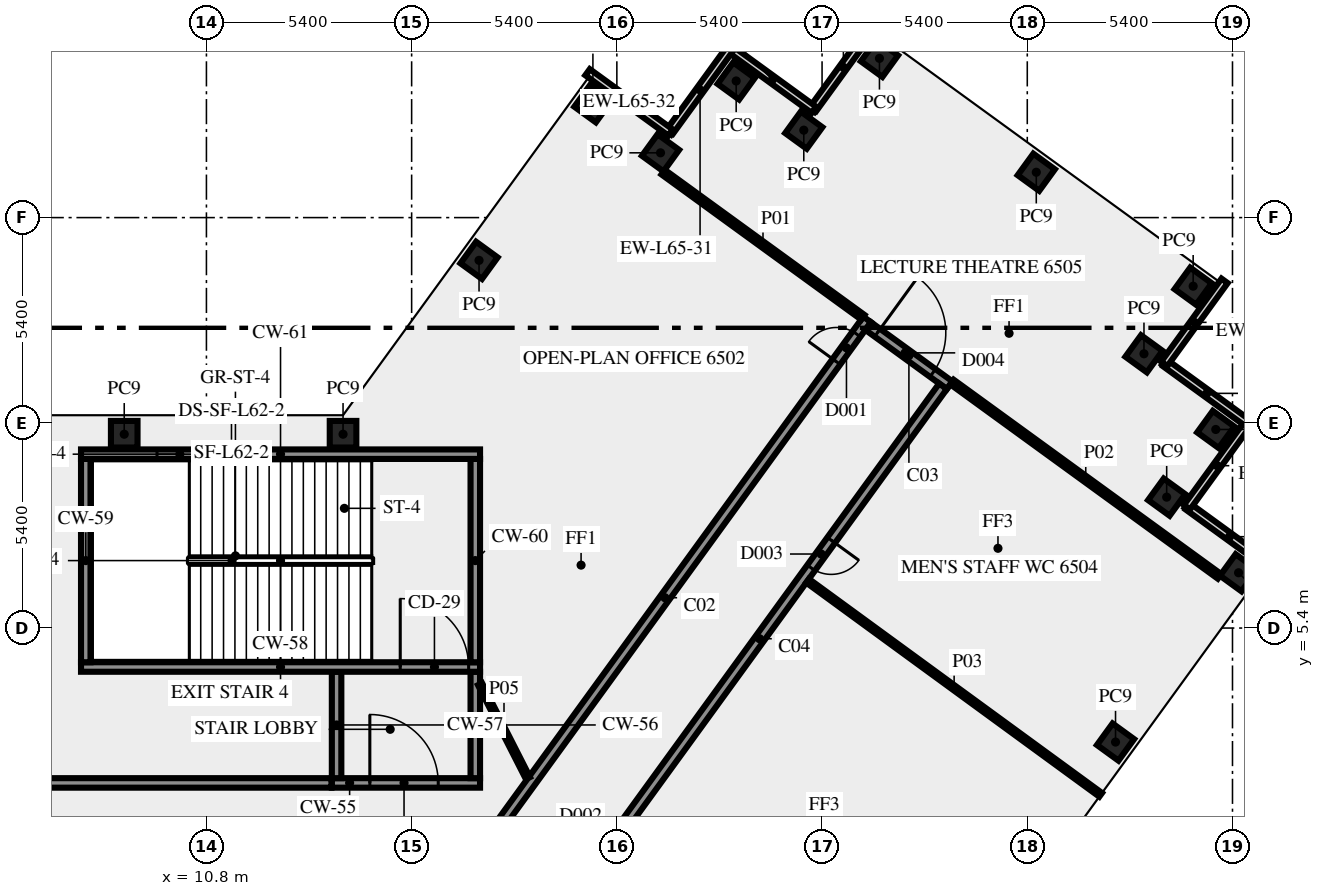
"""IFC4 building model, lengths in metres.
Left out: names, types, materials, properties, quantities, classifications, styles, units other than length and angle.
Written with IfcOpenShell. Run it as: python <this file> out.ifc"""

import sys

from ifc_helpers import new_model, si_unit, direction, frame, frame_2d, origin, origin_2d, place, context, subcontext, project, spatial, rectangle, extrude, element, fill, save


model = new_model("IFC4")
c1 = context("Model", 3, precision=1e-05, world=origin(), true_north=direction((0.0, 1.0)))
c2 = subcontext(c1, "Body", "Model", "MODEL_VIEW")
j1 = project(units=[si_unit("LENGTHUNIT", "METRE"), si_unit("PLANEANGLEUNIT", "RADIAN")], contexts=[c1])
p1 = place(None, origin())
s1 = spatial("IfcSite", under=j1, at=p1, CompositionType="ELEMENT")
p2 = place(p1, origin())
s2 = spatial("IfcBuilding", under=s1, at=p2, CompositionType="ELEMENT")
p3 = place(p2, frame((0.0, 0.0, 281.0)))
s3 = spatial("IfcBuildingStorey", under=s2, at=p3, CompositionType="ELEMENT", Elevation=281.0)
for number, where, z_axis, x_axis in (
    (1, (34.722, 2.4, 0.0), (0.0, 0.0, 1.0), (0.588, 0.809, 0.0)),
    (2, (37.96, 6.855, 0.0), (0.0, 0.0, 1.0), (0.588, 0.809, 0.0)),
    (3, (36.068, 8.844, 0.0), (0.0, 0.0, 1.0), (0.588, 0.809, 0.0)),
    (4, (37.36, 10.625, 0.0), (0.0, 0.0, 1.0), (0.588, 0.809, 0.0)),
    (5, (35.471, 12.616, 0.0), (0.0, 0.0, 1.0), (-0.809, 0.588, 0.0)),
    (6, (36.765, 14.395, 0.0), (0.0, 0.0, 1.0), (-0.809, 0.588, 0.0)),
    (7, (32.637, 17.393, 0.0), (0.0, 0.0, 1.0), (-0.809, 0.588, 0.0)),
    (8, (28.51, 20.39, 0.0), (0.0, 0.0, 1.0), (-0.588, -0.809, 0.0)),
    (9, (26.519, 18.5, 0.0), (0.0, 0.0, 1.0), (-0.809, 0.588, 0.0)),
    (10, (24.74, 19.795, 0.0), (0.0, 0.0, 1.0), (-0.588, -0.809, 0.0)),
    (11, (22.749, 17.904, 0.0), (0.0, 0.0, 1.0), (-0.588, -0.809, 0.0)),
    (12, (20.97, 19.195, 0.0), (0.0, 0.0, 1.0), (-0.588, -0.809, 0.0)),
    (13, (17.974, 15.075, 0.0), (0.0, 0.0, 1.0), (-0.588, -0.809, 0.0)),
    (14, (14.395, 10.5, 0.0), (0.0, 0.0, 1.0), (-1.0, 0.0, 0.0)),
    (15, (8.637, 10.5, 0.0), (0.0, 0.0, 1.0), (-1.0, 0.0, 0.0)),
):
    element("IfcColumn", number, at=place(p3, frame(where, z_axis=z_axis, x_axis=x_axis)), inside=s3, PredefinedType="COLUMN", context=c2, shape_type="SweptSolid", body=[
        extrude(rectangle(XDim=0.7, YDim=0.7, at=origin_2d()), origin(), (0.0, 0.0, 1.0), 3.65),
    ])
for number, where, z_axis, x_axis in (
    (16, (38.814, 7.01, 0.0), (0.0, 0.0, 1.0), (-0.809, 0.588, 0.0)),
    (17, (36.602, 8.58, 0.0), (0.0, 0.0, 1.0), (0.588, 0.809, 0.0)),
    (18, (38.216, 10.782, 0.0), (0.0, 0.0, 1.0), (-0.809, 0.588, 0.0)),
    (19, (36.005, 12.352, 0.0), (0.0, 0.0, 1.0), (0.588, 0.809, 0.0)),
):
    element("IfcWall", number, at=place(p3, frame(where, z_axis=z_axis, x_axis=x_axis)), inside=s3, PredefinedType="SOLIDWALL", context=c2, shape_type="SweptSolid", body=[
        extrude(rectangle(XDim=2.7, YDim=0.2, at=frame_2d((1.35, 0.0))), origin(), (0.0, 0.0, 1.0), 3.65),
    ])
for number, where, z_axis, x_axis in (
    (20, (28.354, 21.247, 0.0), (0.0, 0.0, 1.0), (-0.588, -0.809, 0.0)),
    (21, (26.785, 19.036, 0.0), (0.0, 0.0, 1.0), (-0.809, 0.588, 0.0)),
):
    element("IfcWall", number, at=place(p3, frame(where, z_axis=z_axis, x_axis=x_axis)), inside=s3, PredefinedType="SOLIDWALL", context=c2, shape_type="SweptSolid", body=[
        extrude(rectangle(XDim=2.7, YDim=0.2, at=frame_2d((1.35, 0.0))), origin(), (0.0, 0.0, 1.0), 3.65),
    ])
for number, where, z_axis, x_axis in (
    (22, (24.583, 20.65, 0.0), (0.0, 0.0, 1.0), (-0.588, -0.809, 0.0)),
    (23, (23.013, 18.438, 0.0), (0.0, 0.0, 1.0), (-0.809, 0.588, 0.0)),
):
    element("IfcWall", number, at=place(p3, frame(where, z_axis=z_axis, x_axis=x_axis)), inside=s3, PredefinedType="SOLIDWALL", context=c2, shape_type="SweptSolid", body=[
        extrude(rectangle(XDim=2.7, YDim=0.2, at=frame_2d((1.35, 0.0))), origin(), (0.0, 0.0, 1.0), 3.65),
    ])
p4 = place(p3, frame((12.655, 11.1, 0.0), z_axis=(0.0, 0.0, 1.0), x_axis=(-1.0, 0.0, 0.0)))
e24 = element("IfcWall", 24, at=p4, inside=s3, PredefinedType="SOLIDWALL", context=c2, shape_type="SweptSolid", body=[
    extrude(rectangle(XDim=2.392, YDim=0.2, at=frame_2d((1.196, 0.0))), origin(), (0.0, 0.0, 1.0), 3.65),
])
p5 = place(p4, frame((0.596, 0.0, 1.0)))
e25 = element("IfcOpeningElement", 25, at=p5, cuts=e24, PredefinedType="OPENING", context=c2, shape_type="SweptSolid", body=[
    extrude(rectangle(XDim=1.2, YDim=1.2, at=frame_2d((0.6, 0.6))), frame((0.0, 0.11, 0.0), z_axis=(0.0, -1.0, 0.0), x_axis=(1.0, 0.0, 0.0)), (0.0, 0.0, 1.0), 0.22),
])
p6 = place(p3, frame((14.1, 1.325, 0.0), z_axis=(0.0, 0.0, 1.0), x_axis=(1.0, 0.0, 0.0)))
e26 = element("IfcWall", 26, at=p6, inside=s3, PredefinedType="SHEAR", context=c2, shape_type="SweptSolid", body=[
    extrude(rectangle(XDim=3.9, YDim=0.25, at=frame_2d((1.95, 0.0))), origin(), (0.0, 0.0, 1.0), 3.65),
])
p7 = place(p6, frame((1.0, 0.0, 0.0)))
e27 = element("IfcOpeningElement", 27, at=p7, cuts=e26, PredefinedType="OPENING", context=c2, shape_type="SweptSolid", body=[
    extrude(rectangle(XDim=1.8, YDim=2.1, at=frame_2d((0.9, 1.05))), frame((0.0, 0.135, 0.0), z_axis=(0.0, -1.0, 0.0), x_axis=(1.0, 0.0, 0.0)), (0.0, 0.0, 1.0), 0.27),
])
for number, where, z_axis, x_axis in (
    (28, (14.225, 1.45, 0.0), (0.0, 0.0, 1.0), (0.0, 1.0, 0.0)),
    (29, (17.875, 1.45, 0.0), (0.0, 0.0, 1.0), (0.0, 1.0, 0.0)),
):
    element("IfcWall", number, at=place(p3, frame(where, z_axis=z_axis, x_axis=x_axis)), inside=s3, PredefinedType="SHEAR", context=c2, shape_type="SweptSolid", body=[
        extrude(rectangle(XDim=2.8, YDim=0.25, at=frame_2d((1.4, 0.0))), origin(), (0.0, 0.0, 1.0), 3.65),
    ])
p8 = place(p3, frame((7.5, 4.375, 0.0), z_axis=(0.0, 0.0, 1.0), x_axis=(1.0, 0.0, 0.0)))
e30 = element("IfcWall", 30, at=p8, inside=s3, PredefinedType="SHEAR", context=c2, shape_type="SweptSolid", body=[
    extrude(rectangle(XDim=10.5, YDim=0.25, at=frame_2d((5.25, 0.0))), origin(), (0.0, 0.0, 1.0), 3.65),
])
p9 = place(p8, frame((8.4, 0.0, 0.0)))
e31 = element("IfcOpeningElement", 31, at=p9, cuts=e30, PredefinedType="OPENING", context=c2, shape_type="SweptSolid", body=[
    extrude(rectangle(XDim=1.8, YDim=2.1, at=frame_2d((0.9, 1.05))), frame((0.0, 0.135, 0.0), z_axis=(0.0, -1.0, 0.0), x_axis=(1.0, 0.0, 0.0)), (0.0, 0.0, 1.0), 0.27),
])
for number, where, z_axis, x_axis in (
    (32, (7.625, 4.5, 0.0), (0.0, 0.0, 1.0), (0.0, 1.0, 0.0)),
    (33, (17.875, 4.5, 0.0), (0.0, 0.0, 1.0), (0.0, 1.0, 0.0)),
):
    element("IfcWall", number, at=place(p3, frame(where, z_axis=z_axis, x_axis=x_axis)), inside=s3, PredefinedType="SHEAR", context=c2, shape_type="SweptSolid", body=[
        extrude(rectangle(XDim=5.35, YDim=0.25, at=frame_2d((2.675, 0.0))), origin(), (0.0, 0.0, 1.0), 3.65),
    ])
p10 = place(p3, frame((7.5, 9.975, 0.0), z_axis=(0.0, 0.0, 1.0), x_axis=(1.0, 0.0, 0.0)))
e34 = element("IfcWall", 34, at=p10, inside=s3, PredefinedType="SHEAR", context=c2, shape_type="SweptSolid", body=[
    extrude(rectangle(XDim=10.5, YDim=0.25, at=frame_2d((5.25, 0.0))), origin(), (0.0, 0.0, 1.0), 3.65),
])
p11 = place(p10, frame((2.0, 0.0, 1.0)))
e35 = element("IfcOpeningElement", 35, at=p11, cuts=e34, PredefinedType="OPENING", context=c2, shape_type="SweptSolid", body=[
    extrude(rectangle(XDim=1.2, YDim=1.2, at=frame_2d((0.6, 0.6))), frame((0.0, 0.135, 0.0), z_axis=(0.0, -1.0, 0.0), x_axis=(1.0, 0.0, 0.0)), (0.0, 0.0, 1.0), 0.27),
])
p12 = place(p3, frame((-5.341, 1.325, 0.0), z_axis=(0.0, 0.0, 1.0), x_axis=(1.0, 0.0, 0.0)))
e36 = element("IfcWall", 36, at=p12, inside=s3, PredefinedType="SOLIDWALL", context=c2, shape_type="SweptSolid", body=[
    extrude(rectangle(XDim=19.431, YDim=0.25, at=frame_2d((9.716, 0.0))), origin(), (0.0, 0.0, 1.0), 3.65),
])
p13 = place(p12, frame((8.866, 0.0, 0.0)))
e37 = element("IfcOpeningElement", 37, at=p13, cuts=e36, PredefinedType="OPENING", context=c2, shape_type="SweptSolid", body=[
    extrude(rectangle(XDim=1.8, YDim=2.1, at=frame_2d((0.9, 1.05))), frame((0.0, 0.135, 0.0), z_axis=(0.0, -1.0, 0.0), x_axis=(1.0, 0.0, 0.0)), (0.0, 0.0, 1.0), 0.27),
])
p14 = place(p3, frame((17.545, -1.125, 0.0), z_axis=(0.0, 0.0, 1.0), x_axis=(0.58779555165, 0.809009511354, 0.0)))
e38 = element("IfcWall", 38, at=p14, inside=s3, PredefinedType="SOLIDWALL", context=c2, shape_type="SweptSolid", body=[
    extrude(rectangle(XDim=18.103, YDim=0.25, at=frame_2d((9.052, 0.0))), origin(), (0.0, 0.0, 1.0), 3.65),
])
p15 = place(p14, frame((16.728, 0.0, 0.0)))
e39 = element("IfcOpeningElement", 39, at=p15, cuts=e38, PredefinedType="OPENING", context=c2, shape_type="SweptSolid", body=[
    extrude(rectangle(XDim=0.9, YDim=2.1, at=frame_2d((0.45, 1.05))), frame((0.0, 0.135, 0.0), z_axis=(0.0, -1.0, 0.0), x_axis=(1.0, 0.0, 0.0)), (0.0, 0.0, 1.0), 0.27),
])
p16 = place(p3, frame((28.213, 13.346, 0.0), z_axis=(0.0, 0.0, 1.0), x_axis=(0.809006914995, -0.587799125119, 0.0)))
e40 = element("IfcWall", 40, at=p16, inside=s3, PredefinedType="SOLIDWALL", context=c2, shape_type="SweptSolid", body=[
    extrude(rectangle(XDim=2.65, YDim=0.25, at=frame_2d((1.325, 0.0))), origin(), (0.0, 0.0, 1.0), 3.65),
])
p17 = place(p16, frame((0.3, 0.0, 0.0)))
e41 = element("IfcOpeningElement", 41, at=p17, cuts=e40, PredefinedType="OPENING", context=c2, shape_type="SweptSolid", body=[
    extrude(rectangle(XDim=1.8, YDim=2.1, at=frame_2d((0.9, 1.05))), frame((0.0, 0.135, 0.0), z_axis=(0.0, -1.0, 0.0), x_axis=(1.0, 0.0, 0.0)), (0.0, 0.0, 1.0), 0.27),
])
p18 = place(p3, frame((30.183, 11.761, 0.0), z_axis=(0.0, 0.0, 1.0), x_axis=(-0.587781762867, -0.80901952958, 0.0)))
e42 = element("IfcWall", 42, at=p18, inside=s3, PredefinedType="SOLIDWALL", context=c2, shape_type="SweptSolid", body=[
    extrude(rectangle(XDim=16.42, YDim=0.25, at=frame_2d((8.21, 0.0))), origin(), (0.0, 0.0, 1.0), 3.65),
])
p19 = place(p18, frame((5.005, 0.0, 0.0)))
e43 = element("IfcOpeningElement", 43, at=p19, cuts=e42, PredefinedType="OPENING", context=c2, shape_type="SweptSolid", body=[
    extrude(rectangle(XDim=0.9, YDim=2.1, at=frame_2d((0.45, 1.05))), frame((0.0, 0.135, 0.0), z_axis=(0.0, -1.0, 0.0), x_axis=(1.0, 0.0, 0.0)), (0.0, 0.0, 1.0), 0.27),
])
p20 = place(p18, frame((14.988, 0.0, 0.0)))
e44 = element("IfcOpeningElement", 44, at=p20, cuts=e42, PredefinedType="OPENING", context=c2, shape_type="SweptSolid", body=[
    extrude(rectangle(XDim=0.9, YDim=2.1, at=frame_2d((0.45, 1.05))), frame((0.0, 0.135, 0.0), z_axis=(0.0, -1.0, 0.0), x_axis=(1.0, 0.0, 0.0)), (0.0, 0.0, 1.0), 0.27),
])
p21 = place(p3, frame((28.073, 13.578, 0.0), z_axis=(0.0, 0.0, 1.0), x_axis=(-0.809000932727, 0.587807358619, 0.0)))
e45 = element("IfcWall", 45, at=p21, inside=s3, PredefinedType="PARTITIONING", context=c2, shape_type="SweptSolid", body=[
    extrude(rectangle(XDim=6.496, YDim=0.15, at=frame_2d((3.248, 0.0))), origin(), (0.0, 0.0, 1.0), 3.65),
])
p22 = place(p3, frame((37.458, 6.76, 0.0), z_axis=(0.0, 0.0, 1.0), x_axis=(-0.809016295501, 0.587786214209, 0.0)))
e46 = element("IfcWall", 46, at=p22, inside=s3, PredefinedType="PARTITIONING", context=c2, shape_type="SweptSolid", body=[
    extrude(rectangle(XDim=8.7, YDim=0.15, at=frame_2d((4.35, 0.0))), origin(), (0.0, 0.0, 1.0), 3.65),
])
p23 = place(p3, frame((26.619, 6.643, 0.0), z_axis=(0.0, 0.0, 1.0), x_axis=(0.807594822539, -0.589737740532, 0.0)))
e47 = element("IfcWall", 47, at=p23, inside=s3, PredefinedType="PARTITIONING", context=c2, shape_type="SweptSolid", body=[
    extrude(rectangle(XDim=9.55, YDim=0.12, at=frame_2d((4.775, 0.0))), origin(), (0.0, 0.0, 1.0), 2.95),
])
p24 = place(p3, frame((18.0, 3.925, 0.0), z_axis=(0.0, 0.0, 1.0), x_axis=(0.453950796792, -0.891026752736, 0.0)))
e48 = element("IfcWall", 48, at=p24, inside=s3, PredefinedType="PARTITIONING", context=c2, shape_type="SweptSolid", body=[
    extrude(rectangle(XDim=2.778, YDim=0.12, at=frame_2d((1.389, 0.0))), origin(), (0.0, 0.0, 1.0), 3.65),
])
p25 = place(p5, origin())
e49 = element("IfcWindow", 49, at=p25, inside=s3, PartitioningType="SINGLE_PANEL", PredefinedType="WINDOW", context=c2, shape_type="SweptSolid", body=[
    extrude(rectangle(XDim=1.2, YDim=1.2, at=frame_2d((0.6, 0.6))), frame((0.0, 0.03, 0.0), z_axis=(0.0, -1.0, 0.0), x_axis=(1.0, 0.0, 0.0)), (0.0, 0.0, 1.0), 0.06),
])
fill(e25, e49)
p26 = place(p7, origin())
e50 = element("IfcDoor", 50, at=p26, inside=s3, OperationType="DOUBLE_DOOR_SINGLE_SWING", PredefinedType="DOOR", context=c2, shape_type="SweptSolid", body=[
    extrude(rectangle(XDim=1.8, YDim=2.1, at=frame_2d((0.9, 1.05))), frame((0.0, 0.025, 0.0), z_axis=(0.0, -1.0, 0.0), x_axis=(1.0, 0.0, 0.0)), (0.0, 0.0, 1.0), 0.05),
])
fill(e27, e50)
p27 = place(p9, origin())
e51 = element("IfcDoor", 51, at=p27, inside=s3, OperationType="DOUBLE_DOOR_SINGLE_SWING", PredefinedType="DOOR", context=c2, shape_type="SweptSolid", body=[
    extrude(rectangle(XDim=1.8, YDim=2.1, at=frame_2d((0.9, 1.05))), frame((0.0, 0.025, 0.0), z_axis=(0.0, -1.0, 0.0), x_axis=(1.0, 0.0, 0.0)), (0.0, 0.0, 1.0), 0.05),
])
fill(e31, e51)
p28 = place(p11, origin())
e52 = element("IfcWindow", 52, at=p28, inside=s3, PartitioningType="SINGLE_PANEL", PredefinedType="WINDOW", context=c2, shape_type="SweptSolid", body=[
    extrude(rectangle(XDim=1.2, YDim=1.2, at=frame_2d((0.6, 0.6))), frame((0.0, 0.03, 0.0), z_axis=(0.0, -1.0, 0.0), x_axis=(1.0, 0.0, 0.0)), (0.0, 0.0, 1.0), 0.06),
])
fill(e35, e52)
p29 = place(p15, origin())
e53 = element("IfcDoor", 53, at=p29, inside=s3, OperationType="SINGLE_SWING_RIGHT", PredefinedType="DOOR", context=c2, shape_type="SweptSolid", body=[
    extrude(rectangle(XDim=0.9, YDim=2.1, at=frame_2d((0.45, 1.05))), frame((0.0, 0.025, 0.0), z_axis=(0.0, -1.0, 0.0), x_axis=(1.0, 0.0, 0.0)), (0.0, 0.0, 1.0), 0.05),
])
fill(e39, e53)
p30 = place(p19, origin())
e54 = element("IfcDoor", 54, at=p30, inside=s3, OperationType="SINGLE_SWING_RIGHT", PredefinedType="DOOR", context=c2, shape_type="SweptSolid", body=[
    extrude(rectangle(XDim=0.9, YDim=2.1, at=frame_2d((0.45, 1.05))), frame((0.0, 0.025, 0.0), z_axis=(0.0, -1.0, 0.0), x_axis=(1.0, 0.0, 0.0)), (0.0, 0.0, 1.0), 0.05),
])
fill(e43, e54)
p31 = place(p17, origin())
e55 = element("IfcDoor", 55, at=p31, inside=s3, OperationType="DOUBLE_DOOR_SINGLE_SWING", PredefinedType="DOOR", context=c2, shape_type="SweptSolid", body=[
    extrude(rectangle(XDim=1.8, YDim=2.1, at=frame_2d((0.9, 1.05))), frame((0.0, 0.025, 0.0), z_axis=(0.0, -1.0, 0.0), x_axis=(1.0, 0.0, 0.0)), (0.0, 0.0, 1.0), 0.05),
])
fill(e41, e55)
save(model, sys.argv[1])
